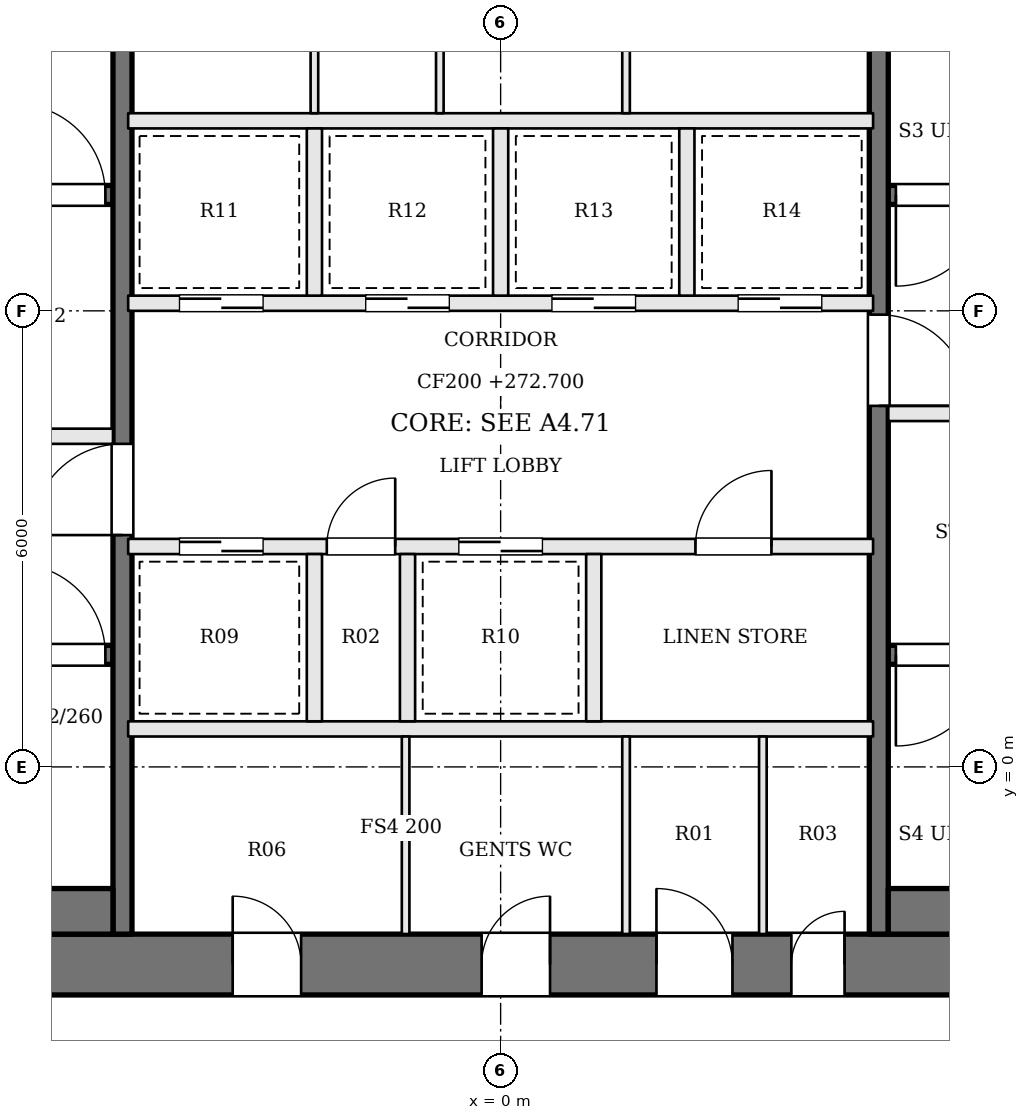
"""IFC4 building model, lengths in metres.
Left out: names, types, materials, properties, quantities, classifications, styles, units other than length and angle.
Written with IfcOpenShell. Run it as: python <this file> out.ifc"""

import sys

from ifc_helpers import new_model, si_unit, direction, frame, frame_2d, origin, place, context, subcontext, project, spatial, rectangle, extrude, element, fill, save


model = new_model("IFC4")
c1 = context("Model", 3, precision=1e-05, world=origin(), true_north=direction((0.0, 1.0)))
c2 = subcontext(c1, "Body", "Model", "MODEL_VIEW")
j1 = project(units=[si_unit("LENGTHUNIT", "METRE"), si_unit("PLANEANGLEUNIT", "RADIAN")], contexts=[c1])
p1 = place(None, origin())
s1 = spatial("IfcSite", under=j1, at=p1, CompositionType="ELEMENT")
p2 = place(p1, origin())
s2 = spatial("IfcBuilding", under=s1, at=p2, CompositionType="ELEMENT")
p3 = place(p2, frame((0.0, 0.0, 272.7)))
s3 = spatial("IfcBuildingStorey", under=s2, at=p3, CompositionType="ELEMENT", Elevation=272.7)
p4 = place(p3, frame((-13.0, -2.6, 0.0), z_axis=(0.0, 0.0, 1.0), x_axis=(1.0, 0.0, 0.0)))
e1 = element("IfcWall", 1, at=p4, inside=s3, PredefinedType="SHEAR", context=c2, shape_type="SweptSolid", body=[
    extrude(rectangle(XDim=26.0, YDim=0.8, at=frame_2d((13.0, 0.0))), origin(), (0.0, 0.0, 1.0), 3.9),
])
p5 = place(p4, frame((9.475, 0.0, 0.0)))
e2 = element("IfcOpeningElement", 2, at=p5, cuts=e1, PredefinedType="OPENING", context=c2, shape_type="SweptSolid", body=[
    extrude(rectangle(XDim=0.9, YDim=2.1, at=frame_2d((0.45, 1.05))), frame((0.0, 0.41, 0.0), z_axis=(0.0, -1.0, 0.0), x_axis=(1.0, 0.0, 0.0)), (0.0, 0.0, 1.0), 0.82),
])
p6 = place(p4, frame((12.75, 0.0, 0.0)))
e3 = element("IfcOpeningElement", 3, at=p6, cuts=e1, PredefinedType="OPENING", context=c2, shape_type="SweptSolid", body=[
    extrude(rectangle(XDim=0.9, YDim=2.1, at=frame_2d((0.45, 1.05))), frame((0.0, 0.41, 0.0), z_axis=(0.0, -1.0, 0.0), x_axis=(1.0, 0.0, 0.0)), (0.0, 0.0, 1.0), 0.82),
])
p7 = place(p4, frame((15.05, 0.0, 0.0)))
e4 = element("IfcOpeningElement", 4, at=p7, cuts=e1, PredefinedType="OPENING", context=c2, shape_type="SweptSolid", body=[
    extrude(rectangle(XDim=1.0, YDim=2.1, at=frame_2d((0.5, 1.05))), frame((0.0, 0.41, 0.0), z_axis=(0.0, -1.0, 0.0), x_axis=(1.0, 0.0, 0.0)), (0.0, 0.0, 1.0), 0.82),
])
p8 = place(p4, frame((16.825, 0.0, 0.0)))
e5 = element("IfcOpeningElement", 5, at=p8, cuts=e1, PredefinedType="OPENING", context=c2, shape_type="SweptSolid", body=[
    extrude(rectangle(XDim=0.7, YDim=2.1, at=frame_2d((0.35, 1.05))), frame((0.0, 0.41, 0.0), z_axis=(0.0, -1.0, 0.0), x_axis=(1.0, 0.0, 0.0)), (0.0, 0.0, 1.0), 0.82),
])
p9 = place(p3, frame((-12.2, 1.475, 0.0), z_axis=(0.0, 0.0, 1.0), x_axis=(1.0, 0.0, 0.0)))
e6 = element("IfcWall", 6, at=p9, inside=s3, PredefinedType="SOLIDWALL", context=c2, shape_type="SweptSolid", body=[
    extrude(rectangle(XDim=7.1, YDim=0.25, at=frame_2d((3.55, 0.0))), origin(), (0.0, 0.0, 1.0), 3.7),
])
p10 = place(p9, frame((5.8, 0.0, 0.0)))
e7 = element("IfcOpeningElement", 7, at=p10, cuts=e6, PredefinedType="OPENING", context=c2, shape_type="SweptSolid", body=[
    extrude(rectangle(XDim=1.2, YDim=2.1, at=frame_2d((0.6, 1.05))), frame((0.0, 0.135, 0.0), z_axis=(0.0, -1.0, 0.0), x_axis=(1.0, 0.0, 0.0)), (0.0, 0.0, 1.0), 0.27),
])
p11 = place(p3, frame((12.2, 7.525, 0.0), z_axis=(0.0, 0.0, 1.0), x_axis=(-1.0, 0.0, 0.0)))
e8 = element("IfcWall", 8, at=p11, inside=s3, PredefinedType="SOLIDWALL", context=c2, shape_type="SweptSolid", body=[
    extrude(rectangle(XDim=7.1, YDim=0.25, at=frame_2d((3.55, 0.0))), origin(), (0.0, 0.0, 1.0), 3.7),
])
p12 = place(p11, frame((5.8, 0.0, 0.0)))
e9 = element("IfcOpeningElement", 9, at=p12, cuts=e8, PredefinedType="OPENING", context=c2, shape_type="SweptSolid", body=[
    extrude(rectangle(XDim=1.2, YDim=2.1, at=frame_2d((0.6, 1.05))), frame((0.0, 0.135, 0.0), z_axis=(0.0, -1.0, 0.0), x_axis=(1.0, 0.0, 0.0)), (0.0, 0.0, 1.0), 0.27),
])
p13 = place(p3, frame((-12.2, 4.35, 0.0), z_axis=(0.0, 0.0, 1.0), x_axis=(1.0, 0.0, 0.0)))
e10 = element("IfcWall", 10, at=p13, inside=s3, PredefinedType="SOLIDWALL", context=c2, shape_type="SweptSolid", body=[
    extrude(rectangle(XDim=7.1, YDim=0.2, at=frame_2d((3.55, 0.0))), origin(), (0.0, 0.0, 1.0), 3.7),
])
p14 = place(p13, frame((4.4, 0.0, 0.0)))
e11 = element("IfcOpeningElement", 11, at=p14, cuts=e10, PredefinedType="OPENING", context=c2, shape_type="SweptSolid", body=[
    extrude(rectangle(XDim=1.2, YDim=2.1, at=frame_2d((0.6, 1.05))), frame((0.0, 0.11, 0.0), z_axis=(0.0, -1.0, 0.0), x_axis=(1.0, 0.0, 0.0)), (0.0, 0.0, 1.0), 0.22),
])
p15 = place(p13, frame((1.1, 0.0, 0.0)))
e12 = element("IfcOpeningElement", 12, at=p15, cuts=e10, PredefinedType="OPENING", context=c2, shape_type="SweptSolid", body=[
    extrude(rectangle(XDim=1.2, YDim=2.1, at=frame_2d((0.6, 1.05))), frame((0.0, 0.11, 0.0), z_axis=(0.0, -1.0, 0.0), x_axis=(1.0, 0.0, 0.0)), (0.0, 0.0, 1.0), 0.22),
])
p16 = place(p3, frame((12.2, 4.65, 0.0), z_axis=(0.0, 0.0, 1.0), x_axis=(-1.0, 0.0, 0.0)))
e13 = element("IfcWall", 13, at=p16, inside=s3, PredefinedType="SOLIDWALL", context=c2, shape_type="SweptSolid", body=[
    extrude(rectangle(XDim=7.1, YDim=0.2, at=frame_2d((3.55, 0.0))), origin(), (0.0, 0.0, 1.0), 3.7),
])
p17 = place(p16, frame((4.4, 0.0, 0.0)))
e14 = element("IfcOpeningElement", 14, at=p17, cuts=e13, PredefinedType="OPENING", context=c2, shape_type="SweptSolid", body=[
    extrude(rectangle(XDim=1.2, YDim=2.1, at=frame_2d((0.6, 1.05))), frame((0.0, 0.11, 0.0), z_axis=(0.0, -1.0, 0.0), x_axis=(1.0, 0.0, 0.0)), (0.0, 0.0, 1.0), 0.22),
])
p18 = place(p16, frame((1.1, 0.0, 0.0)))
e15 = element("IfcOpeningElement", 15, at=p18, cuts=e13, PredefinedType="OPENING", context=c2, shape_type="SweptSolid", body=[
    extrude(rectangle(XDim=1.2, YDim=2.1, at=frame_2d((0.6, 1.05))), frame((0.0, 0.11, 0.0), z_axis=(0.0, -1.0, 0.0), x_axis=(1.0, 0.0, 0.0)), (0.0, 0.0, 1.0), 0.22),
])
p19 = place(p3, frame((-12.2, 7.525, 0.0), z_axis=(0.0, 0.0, 1.0), x_axis=(1.0, 0.0, 0.0)))
e16 = element("IfcWall", 16, at=p19, inside=s3, PredefinedType="SOLIDWALL", context=c2, shape_type="SweptSolid", body=[
    extrude(rectangle(XDim=7.1, YDim=0.25, at=frame_2d((3.55, 0.0))), origin(), (0.0, 0.0, 1.0), 3.7),
])
p20 = place(p19, frame((5.8, 0.0, 0.0)))
e17 = element("IfcOpeningElement", 17, at=p20, cuts=e16, PredefinedType="OPENING", context=c2, shape_type="SweptSolid", body=[
    extrude(rectangle(XDim=1.2, YDim=2.1, at=frame_2d((0.6, 1.05))), frame((0.0, 0.135, 0.0), z_axis=(0.0, -1.0, 0.0), x_axis=(1.0, 0.0, 0.0)), (0.0, 0.0, 1.0), 0.27),
])
p21 = place(p3, frame((12.2, 1.475, 0.0), z_axis=(0.0, 0.0, 1.0), x_axis=(-1.0, 0.0, 0.0)))
e18 = element("IfcWall", 18, at=p21, inside=s3, PredefinedType="SOLIDWALL", context=c2, shape_type="SweptSolid", body=[
    extrude(rectangle(XDim=7.1, YDim=0.25, at=frame_2d((3.55, 0.0))), origin(), (0.0, 0.0, 1.0), 3.7),
])
p22 = place(p21, frame((5.8, 0.0, 0.0)))
e19 = element("IfcOpeningElement", 19, at=p22, cuts=e18, PredefinedType="OPENING", context=c2, shape_type="SweptSolid", body=[
    extrude(rectangle(XDim=1.2, YDim=2.1, at=frame_2d((0.6, 1.05))), frame((0.0, 0.135, 0.0), z_axis=(0.0, -1.0, 0.0), x_axis=(1.0, 0.0, 0.0)), (0.0, 0.0, 1.0), 0.27),
])
p23 = place(p3, frame((-4.975, -2.2, 0.0), z_axis=(0.0, 0.0, 1.0), x_axis=(0.0, 1.0, 0.0)))
e20 = element("IfcWall", 20, at=p23, inside=s3, PredefinedType="SOLIDWALL", context=c2, shape_type="SweptSolid", body=[
    extrude(rectangle(XDim=13.4, YDim=0.25, at=frame_2d((6.7, 0.0))), origin(), (0.0, 0.0, 1.0), 3.7),
])
p24 = place(p23, frame((5.25, 0.0, 0.0)))
e21 = element("IfcOpeningElement", 21, at=p24, cuts=e20, PredefinedType="OPENING", context=c2, shape_type="SweptSolid", body=[
    extrude(rectangle(XDim=1.2, YDim=2.1, at=frame_2d((0.6, 1.05))), frame((0.0, 0.135, 0.0), z_axis=(0.0, -1.0, 0.0), x_axis=(1.0, 0.0, 0.0)), (0.0, 0.0, 1.0), 0.27),
])
p25 = place(p3, frame((4.975, 11.2, 0.0), z_axis=(0.0, 0.0, 1.0), x_axis=(0.0, -1.0, 0.0)))
e22 = element("IfcWall", 22, at=p25, inside=s3, PredefinedType="SOLIDWALL", context=c2, shape_type="SweptSolid", body=[
    extrude(rectangle(XDim=13.4, YDim=0.25, at=frame_2d((6.7, 0.0))), origin(), (0.0, 0.0, 1.0), 3.7),
])
p26 = place(p25, frame((5.25, 0.0, 0.0)))
e23 = element("IfcOpeningElement", 23, at=p26, cuts=e22, PredefinedType="OPENING", context=c2, shape_type="SweptSolid", body=[
    extrude(rectangle(XDim=1.2, YDim=2.1, at=frame_2d((0.6, 1.05))), frame((0.0, 0.135, 0.0), z_axis=(0.0, -1.0, 0.0), x_axis=(1.0, 0.0, 0.0)), (0.0, 0.0, 1.0), 0.27),
])
for number, where, z_axis, x_axis in (
    (24, (-12.2, -1.9, 0.0), (0.0, 0.0, 1.0), (1.0, 0.0, 0.0)),
    (25, (12.2, -1.9, 0.0), (0.0, 0.0, 1.0), (-1.0, 0.0, 0.0)),
):
    element("IfcWall", number, at=place(p3, frame(where, z_axis=z_axis, x_axis=x_axis)), inside=s3, PredefinedType="SOLIDWALL", context=c2, shape_type="SweptSolid", body=[
        extrude(rectangle(XDim=7.1, YDim=0.6, at=frame_2d((3.55, 0.0))), origin(), (0.0, 0.0, 1.0), 3.7),
    ])
p27 = place(p3, frame((-4.9, 0.5, 0.0), z_axis=(0.0, 0.0, 1.0), x_axis=(1.0, 0.0, 0.0)))
e26 = element("IfcWall", 26, at=p27, inside=s3, PredefinedType="SOLIDWALL", context=c2, shape_type="SweptSolid", body=[
    extrude(rectangle(XDim=9.8, YDim=0.2, at=frame_2d((4.9, 0.0))), origin(), (0.0, 0.0, 1.0), 3.7),
])
p28 = place(p3, frame((-4.9, 2.9, 0.0), z_axis=(0.0, 0.0, 1.0), x_axis=(1.0, 0.0, 0.0)))
e27 = element("IfcWall", 27, at=p28, inside=s3, PredefinedType="SOLIDWALL", context=c2, shape_type="SweptSolid", body=[
    extrude(rectangle(XDim=9.8, YDim=0.2, at=frame_2d((4.9, 0.0))), origin(), (0.0, 0.0, 1.0), 3.7),
])
p29 = place(p28, frame((0.675, 0.0, 0.0)))
e28 = element("IfcOpeningElement", 28, at=p29, cuts=e27, PredefinedType="OPENING", context=c2, shape_type="SweptSolid", body=[
    extrude(rectangle(XDim=1.1, YDim=2.1, at=frame_2d((0.55, 1.05))), frame((0.0, 0.11, 0.0), z_axis=(0.0, -1.0, 0.0), x_axis=(1.0, 0.0, 0.0)), (0.0, 0.0, 1.0), 0.22),
])
p30 = place(p28, frame((2.613, 0.0, 0.0)))
e29 = element("IfcOpeningElement", 29, at=p30, cuts=e27, PredefinedType="OPENING", context=c2, shape_type="SweptSolid", body=[
    extrude(rectangle(XDim=0.9, YDim=2.1, at=frame_2d((0.45, 1.05))), frame((0.0, 0.11, 0.0), z_axis=(0.0, -1.0, 0.0), x_axis=(1.0, 0.0, 0.0)), (0.0, 0.0, 1.0), 0.22),
])
p31 = place(p28, frame((4.35, 0.0, 0.0)))
e30 = element("IfcOpeningElement", 30, at=p31, cuts=e27, PredefinedType="OPENING", context=c2, shape_type="SweptSolid", body=[
    extrude(rectangle(XDim=1.1, YDim=2.1, at=frame_2d((0.55, 1.05))), frame((0.0, 0.11, 0.0), z_axis=(0.0, -1.0, 0.0), x_axis=(1.0, 0.0, 0.0)), (0.0, 0.0, 1.0), 0.22),
])
p32 = place(p28, frame((7.463, 0.0, 0.0)))
e31 = element("IfcOpeningElement", 31, at=p32, cuts=e27, PredefinedType="OPENING", context=c2, shape_type="SweptSolid", body=[
    extrude(rectangle(XDim=1.0, YDim=2.1, at=frame_2d((0.5, 1.05))), frame((0.0, 0.11, 0.0), z_axis=(0.0, -1.0, 0.0), x_axis=(1.0, 0.0, 0.0)), (0.0, 0.0, 1.0), 0.22),
])
p33 = place(p3, frame((-4.9, 6.1, 0.0), z_axis=(0.0, 0.0, 1.0), x_axis=(1.0, 0.0, 0.0)))
e32 = element("IfcWall", 32, at=p33, inside=s3, PredefinedType="SOLIDWALL", context=c2, shape_type="SweptSolid", body=[
    extrude(rectangle(XDim=9.8, YDim=0.2, at=frame_2d((4.9, 0.0))), origin(), (0.0, 0.0, 1.0), 3.7),
])
p34 = place(p33, frame((0.675, 0.0, 0.0)))
e33 = element("IfcOpeningElement", 33, at=p34, cuts=e32, PredefinedType="OPENING", context=c2, shape_type="SweptSolid", body=[
    extrude(rectangle(XDim=1.1, YDim=2.1, at=frame_2d((0.55, 1.05))), frame((0.0, 0.11, 0.0), z_axis=(0.0, -1.0, 0.0), x_axis=(1.0, 0.0, 0.0)), (0.0, 0.0, 1.0), 0.22),
])
p35 = place(p33, frame((3.125, 0.0, 0.0)))
e34 = element("IfcOpeningElement", 34, at=p35, cuts=e32, PredefinedType="OPENING", context=c2, shape_type="SweptSolid", body=[
    extrude(rectangle(XDim=1.1, YDim=2.1, at=frame_2d((0.55, 1.05))), frame((0.0, 0.11, 0.0), z_axis=(0.0, -1.0, 0.0), x_axis=(1.0, 0.0, 0.0)), (0.0, 0.0, 1.0), 0.22),
])
p36 = place(p33, frame((5.575, 0.0, 0.0)))
e35 = element("IfcOpeningElement", 35, at=p36, cuts=e32, PredefinedType="OPENING", context=c2, shape_type="SweptSolid", body=[
    extrude(rectangle(XDim=1.1, YDim=2.1, at=frame_2d((0.55, 1.05))), frame((0.0, 0.11, 0.0), z_axis=(0.0, -1.0, 0.0), x_axis=(1.0, 0.0, 0.0)), (0.0, 0.0, 1.0), 0.22),
])
p37 = place(p33, frame((8.025, 0.0, 0.0)))
e36 = element("IfcOpeningElement", 36, at=p37, cuts=e32, PredefinedType="OPENING", context=c2, shape_type="SweptSolid", body=[
    extrude(rectangle(XDim=1.1, YDim=2.1, at=frame_2d((0.55, 1.05))), frame((0.0, 0.11, 0.0), z_axis=(0.0, -1.0, 0.0), x_axis=(1.0, 0.0, 0.0)), (0.0, 0.0, 1.0), 0.22),
])
p38 = place(p3, frame((-4.9, 8.5, 0.0), z_axis=(0.0, 0.0, 1.0), x_axis=(1.0, 0.0, 0.0)))
e37 = element("IfcWall", 37, at=p38, inside=s3, PredefinedType="SOLIDWALL", context=c2, shape_type="SweptSolid", body=[
    extrude(rectangle(XDim=9.8, YDim=0.2, at=frame_2d((4.9, 0.0))), origin(), (0.0, 0.0, 1.0), 3.7),
])
for number, where, z_axis, x_axis in (
    (38, (-2.45, 0.6, 0.0), (0.0, 0.0, 1.0), (0.0, 1.0, 0.0)),
    (39, (-1.225, 0.6, 0.0), (0.0, 0.0, 1.0), (0.0, 1.0, 0.0)),
    (40, (1.225, 0.6, 0.0), (0.0, 0.0, 1.0), (0.0, 1.0, 0.0)),
    (41, (-2.45, 6.2, 0.0), (0.0, 0.0, 1.0), (0.0, 1.0, 0.0)),
    (42, (0.0, 6.2, 0.0), (0.0, 0.0, 1.0), (0.0, 1.0, 0.0)),
    (43, (2.45, 6.2, 0.0), (0.0, 0.0, 1.0), (0.0, 1.0, 0.0)),
):
    element("IfcWall", number, at=place(p3, frame(where, z_axis=z_axis, x_axis=x_axis)), inside=s3, PredefinedType="SOLIDWALL", context=c2, shape_type="SweptSolid", body=[
        extrude(rectangle(XDim=2.2, YDim=0.2, at=frame_2d((1.1, 0.0))), origin(), (0.0, 0.0, 1.0), 3.7),
    ])
for number, where, z_axis, x_axis in (
    (44, (-1.25, -2.2, 0.0), (0.0, 0.0, 1.0), (0.0, 1.0, 0.0)),
    (45, (1.65, -2.2, 0.0), (0.0, 0.0, 1.0), (0.0, 1.0, 0.0)),
    (46, (3.45, -2.2, 0.0), (0.0, 0.0, 1.0), (0.0, 1.0, 0.0)),
    (47, (-2.45, 8.6, 0.0), (0.0, 0.0, 1.0), (0.0, 1.0, 0.0)),
    (48, (-0.8, 8.6, 0.0), (0.0, 0.0, 1.0), (0.0, 1.0, 0.0)),
    (49, (1.65, 8.6, 0.0), (0.0, 0.0, 1.0), (0.0, 1.0, 0.0)),
):
    element("IfcWall", number, at=place(p3, frame(where, z_axis=z_axis, x_axis=x_axis)), inside=s3, PredefinedType="PARTITIONING", context=c2, shape_type="SweptSolid", body=[
        extrude(rectangle(XDim=2.6, YDim=0.1, at=frame_2d((1.3, 0.0))), origin(), (0.0, 0.0, 1.0), 3.7),
    ])
p39 = place(p24, origin())
e50 = element("IfcDoor", 50, at=p39, inside=s3, OperationType="SINGLE_SWING_LEFT", PredefinedType="DOOR", context=c2, shape_type="SweptSolid", body=[
    extrude(rectangle(XDim=1.2, YDim=2.1, at=frame_2d((0.6, 1.05))), frame((0.0, 0.025, 0.0), z_axis=(0.0, -1.0, 0.0), x_axis=(1.0, 0.0, 0.0)), (0.0, 0.0, 1.0), 0.05),
])
fill(e21, e50)
p40 = place(p26, origin())
e51 = element("IfcDoor", 51, at=p40, inside=s3, OperationType="SINGLE_SWING_RIGHT", PredefinedType="DOOR", context=c2, shape_type="SweptSolid", body=[
    extrude(rectangle(XDim=1.2, YDim=2.1, at=frame_2d((0.6, 1.05))), frame((0.0, 0.025, 0.0), z_axis=(0.0, -1.0, 0.0), x_axis=(1.0, 0.0, 0.0)), (0.0, 0.0, 1.0), 0.05),
])
fill(e23, e51)
p41 = place(p10, origin())
e52 = element("IfcDoor", 52, at=p41, inside=s3, OperationType="SINGLE_SWING_LEFT", PredefinedType="DOOR", context=c2, shape_type="SweptSolid", body=[
    extrude(rectangle(XDim=1.2, YDim=2.1, at=frame_2d((0.6, 1.05))), frame((0.0, 0.025, 0.0), z_axis=(0.0, -1.0, 0.0), x_axis=(1.0, 0.0, 0.0)), (0.0, 0.0, 1.0), 0.05),
])
fill(e7, e52)
p42 = place(p12, origin())
e53 = element("IfcDoor", 53, at=p42, inside=s3, OperationType="SINGLE_SWING_RIGHT", PredefinedType="DOOR", context=c2, shape_type="SweptSolid", body=[
    extrude(rectangle(XDim=1.2, YDim=2.1, at=frame_2d((0.6, 1.05))), frame((0.0, 0.025, 0.0), z_axis=(0.0, -1.0, 0.0), x_axis=(1.0, 0.0, 0.0)), (0.0, 0.0, 1.0), 0.05),
])
fill(e9, e53)
p43 = place(p20, origin())
e54 = element("IfcDoor", 54, at=p43, inside=s3, OperationType="SINGLE_SWING_LEFT", PredefinedType="DOOR", context=c2, shape_type="SweptSolid", body=[
    extrude(rectangle(XDim=1.2, YDim=2.1, at=frame_2d((0.6, 1.05))), frame((0.0, 0.025, 0.0), z_axis=(0.0, -1.0, 0.0), x_axis=(1.0, 0.0, 0.0)), (0.0, 0.0, 1.0), 0.05),
])
fill(e17, e54)
p44 = place(p22, origin())
e55 = element("IfcDoor", 55, at=p44, inside=s3, OperationType="SINGLE_SWING_RIGHT", PredefinedType="DOOR", context=c2, shape_type="SweptSolid", body=[
    extrude(rectangle(XDim=1.2, YDim=2.1, at=frame_2d((0.6, 1.05))), frame((0.0, 0.025, 0.0), z_axis=(0.0, -1.0, 0.0), x_axis=(1.0, 0.0, 0.0)), (0.0, 0.0, 1.0), 0.05),
])
fill(e19, e55)
p45 = place(p29, origin())
e56 = element("IfcDoor", 56, at=p45, inside=s3, OperationType="SLIDING_TO_RIGHT", PredefinedType="DOOR", context=c2, shape_type="SweptSolid", body=[
    extrude(rectangle(XDim=1.1, YDim=2.1, at=frame_2d((0.55, 1.05))), frame((0.0, 0.025, 0.0), z_axis=(0.0, -1.0, 0.0), x_axis=(1.0, 0.0, 0.0)), (0.0, 0.0, 1.0), 0.05),
])
fill(e28, e56)
p46 = place(p30, origin())
e57 = element("IfcDoor", 57, at=p46, inside=s3, OperationType="SINGLE_SWING_RIGHT", PredefinedType="DOOR", context=c2, shape_type="SweptSolid", body=[
    extrude(rectangle(XDim=0.9, YDim=2.1, at=frame_2d((0.45, 1.05))), frame((0.0, 0.025, 0.0), z_axis=(0.0, -1.0, 0.0), x_axis=(1.0, 0.0, 0.0)), (0.0, 0.0, 1.0), 0.05),
])
fill(e29, e57)
p47 = place(p31, origin())
e58 = element("IfcDoor", 58, at=p47, inside=s3, OperationType="SLIDING_TO_LEFT", PredefinedType="DOOR", context=c2, shape_type="SweptSolid", body=[
    extrude(rectangle(XDim=1.1, YDim=2.1, at=frame_2d((0.55, 1.05))), frame((0.0, 0.025, 0.0), z_axis=(0.0, -1.0, 0.0), x_axis=(1.0, 0.0, 0.0)), (0.0, 0.0, 1.0), 0.05),
])
fill(e30, e58)
p48 = place(p32, origin())
e59 = element("IfcDoor", 59, at=p48, inside=s3, OperationType="SINGLE_SWING_RIGHT", PredefinedType="DOOR", context=c2, shape_type="SweptSolid", body=[
    extrude(rectangle(XDim=1.0, YDim=2.1, at=frame_2d((0.5, 1.05))), frame((0.0, 0.025, 0.0), z_axis=(0.0, -1.0, 0.0), x_axis=(1.0, 0.0, 0.0)), (0.0, 0.0, 1.0), 0.05),
])
fill(e31, e59)
p49 = place(p34, origin())
e60 = element("IfcDoor", 60, at=p49, inside=s3, OperationType="SLIDING_TO_RIGHT", PredefinedType="DOOR", context=c2, shape_type="SweptSolid", body=[
    extrude(rectangle(XDim=1.1, YDim=2.1, at=frame_2d((0.55, 1.05))), frame((0.0, 0.025, 0.0), z_axis=(0.0, -1.0, 0.0), x_axis=(1.0, 0.0, 0.0)), (0.0, 0.0, 1.0), 0.05),
])
fill(e33, e60)
p50 = place(p35, origin())
e61 = element("IfcDoor", 61, at=p50, inside=s3, OperationType="SLIDING_TO_LEFT", PredefinedType="DOOR", context=c2, shape_type="SweptSolid", body=[
    extrude(rectangle(XDim=1.1, YDim=2.1, at=frame_2d((0.55, 1.05))), frame((0.0, 0.025, 0.0), z_axis=(0.0, -1.0, 0.0), x_axis=(1.0, 0.0, 0.0)), (0.0, 0.0, 1.0), 0.05),
])
fill(e34, e61)
p51 = place(p36, origin())
e62 = element("IfcDoor", 62, at=p51, inside=s3, OperationType="SLIDING_TO_RIGHT", PredefinedType="DOOR", context=c2, shape_type="SweptSolid", body=[
    extrude(rectangle(XDim=1.1, YDim=2.1, at=frame_2d((0.55, 1.05))), frame((0.0, 0.025, 0.0), z_axis=(0.0, -1.0, 0.0), x_axis=(1.0, 0.0, 0.0)), (0.0, 0.0, 1.0), 0.05),
])
fill(e35, e62)
p52 = place(p37, origin())
e63 = element("IfcDoor", 63, at=p52, inside=s3, OperationType="SLIDING_TO_LEFT", PredefinedType="DOOR", context=c2, shape_type="SweptSolid", body=[
    extrude(rectangle(XDim=1.1, YDim=2.1, at=frame_2d((0.55, 1.05))), frame((0.0, 0.025, 0.0), z_axis=(0.0, -1.0, 0.0), x_axis=(1.0, 0.0, 0.0)), (0.0, 0.0, 1.0), 0.05),
])
fill(e36, e63)
p53 = place(p5, origin())
e64 = element("IfcDoor", 64, at=p53, inside=s3, OperationType="SINGLE_SWING_LEFT", PredefinedType="DOOR", context=c2, shape_type="SweptSolid", body=[
    extrude(rectangle(XDim=0.9, YDim=2.1, at=frame_2d((0.45, 1.05))), frame((0.0, 0.025, 0.0), z_axis=(0.0, -1.0, 0.0), x_axis=(1.0, 0.0, 0.0)), (0.0, 0.0, 1.0), 0.05),
])
fill(e2, e64)
p54 = place(p6, origin())
e65 = element("IfcDoor", 65, at=p54, inside=s3, OperationType="SINGLE_SWING_RIGHT", PredefinedType="DOOR", context=c2, shape_type="SweptSolid", body=[
    extrude(rectangle(XDim=0.9, YDim=2.1, at=frame_2d((0.45, 1.05))), frame((0.0, 0.025, 0.0), z_axis=(0.0, -1.0, 0.0), x_axis=(1.0, 0.0, 0.0)), (0.0, 0.0, 1.0), 0.05),
])
fill(e3, e65)
p55 = place(p7, origin())
e66 = element("IfcDoor", 66, at=p55, inside=s3, OperationType="SINGLE_SWING_LEFT", PredefinedType="DOOR", context=c2, shape_type="SweptSolid", body=[
    extrude(rectangle(XDim=1.0, YDim=2.1, at=frame_2d((0.5, 1.05))), frame((0.0, 0.025, 0.0), z_axis=(0.0, -1.0, 0.0), x_axis=(1.0, 0.0, 0.0)), (0.0, 0.0, 1.0), 0.05),
])
fill(e4, e66)
p56 = place(p8, origin())
e67 = element("IfcDoor", 67, at=p56, inside=s3, OperationType="SINGLE_SWING_RIGHT", PredefinedType="DOOR", context=c2, shape_type="SweptSolid", body=[
    extrude(rectangle(XDim=0.7, YDim=2.1, at=frame_2d((0.35, 1.05))), frame((0.0, 0.025, 0.0), z_axis=(0.0, -1.0, 0.0), x_axis=(1.0, 0.0, 0.0)), (0.0, 0.0, 1.0), 0.05),
])
fill(e5, e67)
save(model, sys.argv[1])
